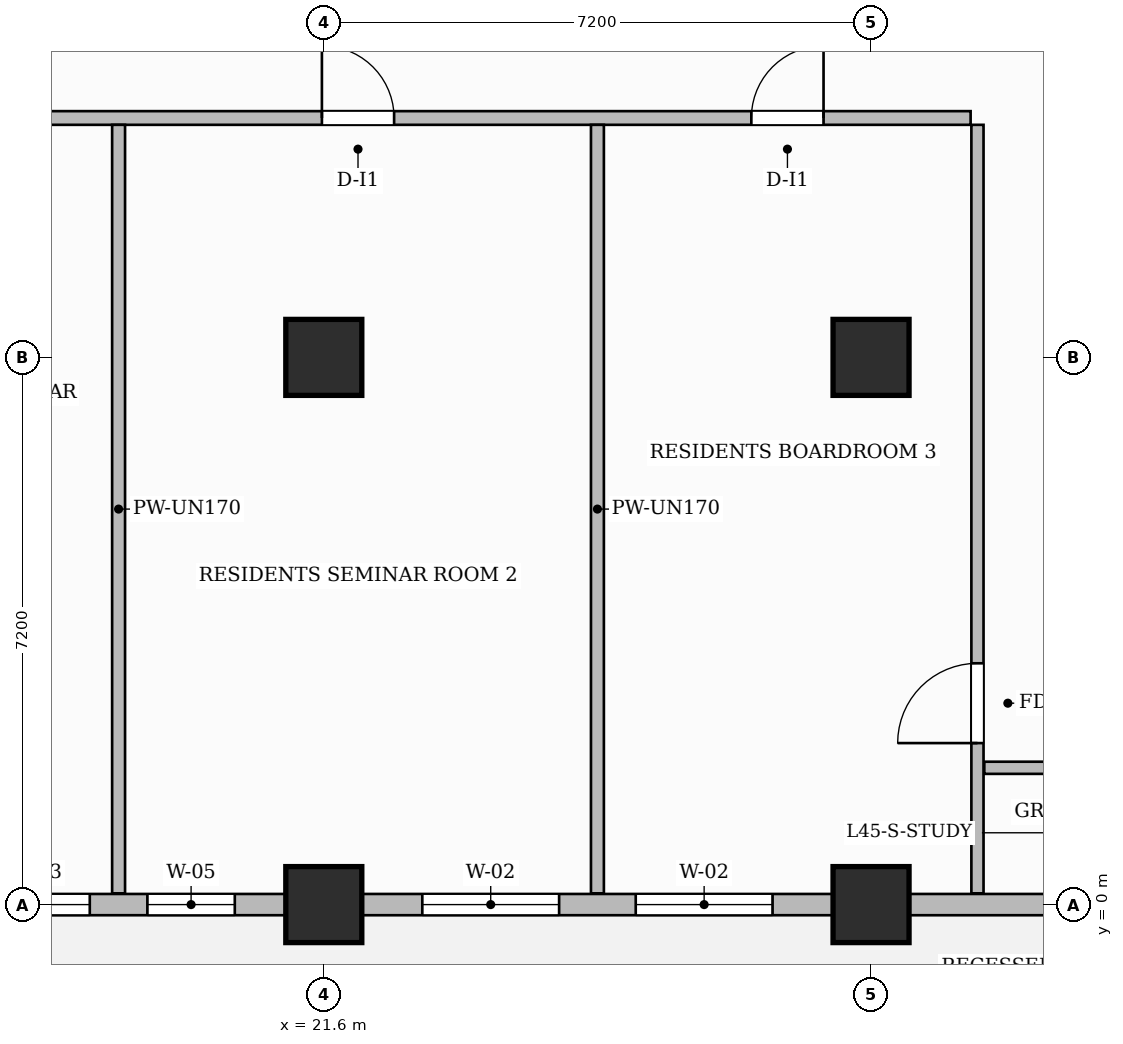
"""IFC4 building model, lengths in metres.
Left out: names, types, materials, properties, quantities, classifications, styles, units other than length and angle.
Written with IfcOpenShell. Run it as: python <this file> out.ifc"""

import sys

from ifc_helpers import new_model, si_unit, direction, frame, frame_2d, origin, origin_2d, place, context, subcontext, project, spatial, rectangle, extrude, source, transform, mapped, element, fill, save


model = new_model("IFC4")
c1 = context("Model", 3, precision=1e-05, world=origin(), true_north=direction((0.0, 1.0)))
c2 = subcontext(c1, "Body", "Model", "MODEL_VIEW")
j1 = project(units=[si_unit("LENGTHUNIT", "METRE"), si_unit("PLANEANGLEUNIT", "RADIAN")], contexts=[c1])
p1 = place(None, origin())
s1 = spatial("IfcSite", under=j1, at=p1, CompositionType="ELEMENT")
p2 = place(p1, origin())
s2 = spatial("IfcBuilding", under=s1, at=p2, CompositionType="ELEMENT")
p3 = place(p2, frame((0.0, 0.0, 181.1)))
s3 = spatial("IfcBuildingStorey", under=s2, at=p3, CompositionType="ELEMENT", Elevation=181.1)
m1 = source(origin(), c2, "Body", "SweptSolid", [
    extrude(rectangle(XDim=1.0, YDim=1.0, at=origin_2d()), origin(), (0.0, 0.0, 1.0), 3.85),
])
for number, where, z_axis, x_axis in (
    (1, (21.6, 0.0, 0.0), (0.0, 0.0, 1.0), (1.0, 0.0, 0.0)),
    (2, (21.6, 7.2, 0.0), (0.0, 0.0, 1.0), (1.0, 0.0, 0.0)),
    (3, (28.8, 0.0, 0.0), (0.0, 0.0, 1.0), (1.0, 0.0, 0.0)),
    (4, (28.8, 7.2, 0.0), (0.0, 0.0, 1.0), (1.0, 0.0, 0.0)),
):
    element("IfcColumn", number, at=place(p3, frame(where, z_axis=z_axis, x_axis=x_axis)), inside=s3, PredefinedType="COLUMN", context=c2, shape_type="MappedRepresentation", body=[
        mapped(m1, transform((0.0, 0.0, 0.0), scale=1.0)),
    ])
p4 = place(p3, frame((14.548, 10.35, 0.0), z_axis=(0.0, 0.0, 1.0), x_axis=(1.0, 0.0, 0.0)))
e5 = element("IfcWall", 5, at=p4, inside=s3, PredefinedType="PARTITIONING", context=c2, shape_type="SweptSolid", body=[
    extrude(rectangle(XDim=15.562, YDim=0.18, at=frame_2d((7.781, 0.0))), origin(), (0.0, 0.0, 1.0), 3.6),
])
p5 = place(p4, frame((1.627, 0.0, 0.0)))
e6 = element("IfcOpeningElement", 6, at=p5, cuts=e5, PredefinedType="OPENING", context=c2, shape_type="SweptSolid", body=[
    extrude(rectangle(XDim=0.95, YDim=2.15, at=frame_2d((0.475, 1.075))), frame((0.0, 0.1, 0.0), z_axis=(0.0, -1.0, 0.0), x_axis=(1.0, 0.0, 0.0)), (0.0, 0.0, 1.0), 0.2),
])
p6 = place(p4, frame((7.027, 0.0, 0.0)))
e7 = element("IfcOpeningElement", 7, at=p6, cuts=e5, PredefinedType="OPENING", context=c2, shape_type="SweptSolid", body=[
    extrude(rectangle(XDim=0.95, YDim=2.15, at=frame_2d((0.475, 1.075))), frame((0.0, 0.1, 0.0), z_axis=(0.0, -1.0, 0.0), x_axis=(1.0, 0.0, 0.0)), (0.0, 0.0, 1.0), 0.2),
])
p7 = place(p4, frame((12.677, 0.0, 0.0)))
e8 = element("IfcOpeningElement", 8, at=p7, cuts=e5, PredefinedType="OPENING", context=c2, shape_type="SweptSolid", body=[
    extrude(rectangle(XDim=0.95, YDim=2.15, at=frame_2d((0.475, 1.075))), frame((0.0, 0.1, 0.0), z_axis=(0.0, -1.0, 0.0), x_axis=(1.0, 0.0, 0.0)), (0.0, 0.0, 1.0), 0.2),
])
p8 = place(p3, frame((30.2, 0.148, 0.0), z_axis=(0.0, 0.0, 1.0), x_axis=(0.0, 1.0, 0.0)))
e9 = element("IfcWall", 9, at=p8, inside=s3, PredefinedType="PARTITIONING", context=c2, shape_type="SweptSolid", body=[
    extrude(rectangle(XDim=10.112, YDim=0.16, at=frame_2d((5.056, 0.0))), origin(), (0.0, 0.0, 1.0), 3.6),
])
p9 = place(p8, frame((1.977, 0.0, 0.0)))
e10 = element("IfcOpeningElement", 10, at=p9, cuts=e9, PredefinedType="OPENING", context=c2, shape_type="SweptSolid", body=[
    extrude(rectangle(XDim=1.05, YDim=2.15, at=frame_2d((0.525, 1.075))), frame((0.0, 0.09, 0.0), z_axis=(0.0, -1.0, 0.0), x_axis=(1.0, 0.0, 0.0)), (0.0, 0.0, 1.0), 0.18),
])
p10 = place(p3, frame((30.29, 1.8, 0.0), z_axis=(0.0, 0.0, 1.0), x_axis=(1.0, 0.0, 0.0)))
e11 = element("IfcWall", 11, at=p10, inside=s3, PredefinedType="PARTITIONING", context=c2, shape_type="SweptSolid", body=[
    extrude(rectangle(XDim=19.37, YDim=0.16, at=frame_2d((9.685, 0.0))), origin(), (0.0, 0.0, 1.0), 3.6),
])
p11 = place(p10, frame((5.074, 0.0, 0.0)))
e12 = element("IfcOpeningElement", 12, at=p11, cuts=e11, PredefinedType="OPENING", context=c2, shape_type="SweptSolid", body=[
    extrude(rectangle(XDim=0.9, YDim=2.15, at=frame_2d((0.45, 1.075))), frame((0.0, 0.09, 0.0), z_axis=(0.0, -1.0, 0.0), x_axis=(1.0, 0.0, 0.0)), (0.0, 0.0, 1.0), 0.18),
])
p12 = place(p10, frame((14.06, 0.0, 0.0)))
e13 = element("IfcOpeningElement", 13, at=p12, cuts=e11, PredefinedType="OPENING", context=c2, shape_type="SweptSolid", body=[
    extrude(rectangle(XDim=0.9, YDim=2.15, at=frame_2d((0.45, 1.075))), frame((0.0, 0.09, 0.0), z_axis=(0.0, -1.0, 0.0), x_axis=(1.0, 0.0, 0.0)), (0.0, 0.0, 1.0), 0.18),
])
p13 = place(p3, frame((18.9, 0.148, 0.0), z_axis=(0.0, 0.0, 1.0), x_axis=(0.0, 1.0, 0.0)))
e14 = element("IfcWall", 14, at=p13, inside=s3, PredefinedType="PARTITIONING", context=c2, shape_type="SweptSolid", body=[
    extrude(rectangle(XDim=10.112, YDim=0.17, at=frame_2d((5.056, 0.0))), origin(), (0.0, 0.0, 1.0), 3.6),
])
p14 = place(p3, frame((25.2, 0.148, 0.0), z_axis=(0.0, 0.0, 1.0), x_axis=(0.0, 1.0, 0.0)))
e15 = element("IfcWall", 15, at=p14, inside=s3, PredefinedType="PARTITIONING", context=c2, shape_type="SweptSolid", body=[
    extrude(rectangle(XDim=10.112, YDim=0.17, at=frame_2d((5.056, 0.0))), origin(), (0.0, 0.0, 1.0), 3.285),
])
p15 = place(p3, frame((14.4, 0.0, 0.0), z_axis=(0.0, 0.0, 1.0), x_axis=(1.0, 0.0, 0.0)))
e16 = element("IfcWall", 16, at=p15, inside=s3, PredefinedType="SOLIDWALL", context=c2, shape_type="SweptSolid", body=[
    extrude(rectangle(XDim=35.4, YDim=0.28, at=frame_2d((17.7, 0.0))), origin(), (0.0, 0.0, 1.0), 3.085),
])
p16 = place(p15, frame((0.85, 0.0, 0.0)))
e17 = element("IfcOpeningElement", 17, at=p16, cuts=e16, PredefinedType="OPENING", context=c2, shape_type="SweptSolid", body=[
    extrude(rectangle(XDim=1.2, YDim=2.2, at=frame_2d((0.6, 1.1))), frame((0.0, 0.15, 0.0), z_axis=(0.0, -1.0, 0.0), x_axis=(1.0, 0.0, 0.0)), (0.0, 0.0, 1.0), 0.3),
])
p17 = place(p15, frame((2.721, 0.0, 0.8)))
e18 = element("IfcOpeningElement", 18, at=p17, cuts=e16, PredefinedType="OPENING", context=c2, shape_type="SweptSolid", body=[
    extrude(rectangle(XDim=1.4, YDim=1.85, at=frame_2d((0.7, 0.925))), frame((0.0, 0.15, 0.0), z_axis=(0.0, -1.0, 0.0), x_axis=(1.0, 0.0, 0.0)), (0.0, 0.0, 1.0), 0.3),
])
p18 = place(p15, frame((4.879, 0.0, 0.8)))
e19 = element("IfcOpeningElement", 19, at=p18, cuts=e16, PredefinedType="OPENING", context=c2, shape_type="SweptSolid", body=[
    extrude(rectangle(XDim=1.15, YDim=1.8, at=frame_2d((0.575, 0.9))), frame((0.0, 0.15, 0.0), z_axis=(0.0, -1.0, 0.0), x_axis=(1.0, 0.0, 0.0)), (0.0, 0.0, 1.0), 0.3),
])
p19 = place(p15, frame((8.496, 0.0, 0.8)))
e20 = element("IfcOpeningElement", 20, at=p19, cuts=e16, PredefinedType="OPENING", context=c2, shape_type="SweptSolid", body=[
    extrude(rectangle(XDim=1.8, YDim=1.85, at=frame_2d((0.9, 0.925))), frame((0.0, 0.15, 0.0), z_axis=(0.0, -1.0, 0.0), x_axis=(1.0, 0.0, 0.0)), (0.0, 0.0, 1.0), 0.3),
])
p20 = place(p15, frame((11.304, 0.0, 0.8)))
e21 = element("IfcOpeningElement", 21, at=p20, cuts=e16, PredefinedType="OPENING", context=c2, shape_type="SweptSolid", body=[
    extrude(rectangle(XDim=1.8, YDim=1.85, at=frame_2d((0.9, 0.925))), frame((0.0, 0.15, 0.0), z_axis=(0.0, -1.0, 0.0), x_axis=(1.0, 0.0, 0.0)), (0.0, 0.0, 1.0), 0.3),
])
p21 = place(p15, frame((16.804, 0.0, 0.8)))
e22 = element("IfcOpeningElement", 22, at=p21, cuts=e16, PredefinedType="OPENING", context=c2, shape_type="SweptSolid", body=[
    extrude(rectangle(XDim=1.8, YDim=1.85, at=frame_2d((0.9, 0.925))), frame((0.0, 0.15, 0.0), z_axis=(0.0, -1.0, 0.0), x_axis=(1.0, 0.0, 0.0)), (0.0, 0.0, 1.0), 0.3),
])
p22 = place(p15, frame((22.396, 0.0, 0.8)))
e23 = element("IfcOpeningElement", 23, at=p22, cuts=e16, PredefinedType="OPENING", context=c2, shape_type="SweptSolid", body=[
    extrude(rectangle(XDim=1.8, YDim=1.85, at=frame_2d((0.9, 0.925))), frame((0.0, 0.15, 0.0), z_axis=(0.0, -1.0, 0.0), x_axis=(1.0, 0.0, 0.0)), (0.0, 0.0, 1.0), 0.3),
])
p23 = place(p15, frame((25.629, 0.0, 0.8)))
e24 = element("IfcOpeningElement", 24, at=p23, cuts=e16, PredefinedType="OPENING", context=c2, shape_type="SweptSolid", body=[
    extrude(rectangle(XDim=0.95, YDim=1.75, at=frame_2d((0.475, 0.875))), frame((0.0, 0.15, 0.0), z_axis=(0.0, -1.0, 0.0), x_axis=(1.0, 0.0, 0.0)), (0.0, 0.0, 1.0), 0.3),
])
p24 = place(p15, frame((29.075, 0.0, 0.8)))
e25 = element("IfcOpeningElement", 25, at=p24, cuts=e16, PredefinedType="OPENING", context=c2, shape_type="SweptSolid", body=[
    extrude(rectangle(XDim=1.8, YDim=1.85, at=frame_2d((0.9, 0.925))), frame((0.0, 0.15, 0.0), z_axis=(0.0, -1.0, 0.0), x_axis=(1.0, 0.0, 0.0)), (0.0, 0.0, 1.0), 0.3),
])
p25 = place(p15, frame((32.125, 0.0, 0.8)))
e26 = element("IfcOpeningElement", 26, at=p25, cuts=e16, PredefinedType="OPENING", context=c2, shape_type="SweptSolid", body=[
    extrude(rectangle(XDim=1.8, YDim=1.85, at=frame_2d((0.9, 0.925))), frame((0.0, 0.15, 0.0), z_axis=(0.0, -1.0, 0.0), x_axis=(1.0, 0.0, 0.0)), (0.0, 0.0, 1.0), 0.3),
])
m2 = source(origin(), c2, "Body", "SweptSolid", [
    extrude(rectangle(XDim=1.05, YDim=2.15, at=frame_2d((0.525, 1.075))), frame((0.0, 0.025, 0.0), z_axis=(0.0, -1.0, 0.0), x_axis=(1.0, 0.0, 0.0)), (0.0, 0.0, 1.0), 0.05),
])
p26 = place(p9, origin())
e27 = element("IfcDoor", 27, at=p26, inside=s3, OperationType="SINGLE_SWING_LEFT", PredefinedType="DOOR", context=c2, shape_type="MappedRepresentation", body=[
    mapped(m2, transform((0.0, 0.0, 0.0), scale=1.0)),
])
fill(e10, e27)
m3 = source(origin(), c2, "Body", "SweptSolid", [
    extrude(rectangle(XDim=0.95, YDim=2.15, at=frame_2d((0.475, 1.075))), frame((0.0, 0.025, 0.0), z_axis=(0.0, -1.0, 0.0), x_axis=(1.0, 0.0, 0.0)), (0.0, 0.0, 1.0), 0.05),
])
p27 = place(p6, origin())
e28 = element("IfcDoor", 28, at=p27, inside=s3, OperationType="SINGLE_SWING_LEFT", PredefinedType="DOOR", context=c2, shape_type="MappedRepresentation", body=[
    mapped(m3, transform((0.0, 0.0, 0.0), scale=1.0)),
])
fill(e7, e28)
p28 = place(p7, origin())
e29 = element("IfcDoor", 29, at=p28, inside=s3, OperationType="SINGLE_SWING_RIGHT", PredefinedType="DOOR", context=c2, shape_type="MappedRepresentation", body=[
    mapped(m3, transform((0.0, 0.0, 0.0), scale=1.0)),
])
fill(e8, e29)
m4 = source(origin(), c2, "Body", "SweptSolid", [
    extrude(rectangle(XDim=1.4, YDim=1.85, at=frame_2d((0.7, 0.925))), frame((0.0, 0.03, 0.0), z_axis=(0.0, -1.0, 0.0), x_axis=(1.0, 0.0, 0.0)), (0.0, 0.0, 1.0), 0.06),
])
p29 = place(p17, origin())
e30 = element("IfcWindow", 30, at=p29, inside=s3, PartitioningType="SINGLE_PANEL", PredefinedType="WINDOW", context=c2, shape_type="MappedRepresentation", body=[
    mapped(m4, transform((0.0, 0.0, 0.0), scale=1.0)),
])
fill(e18, e30)
m5 = source(origin(), c2, "Body", "SweptSolid", [
    extrude(rectangle(XDim=1.15, YDim=1.8, at=frame_2d((0.575, 0.9))), frame((0.0, 0.03, 0.0), z_axis=(0.0, -1.0, 0.0), x_axis=(1.0, 0.0, 0.0)), (0.0, 0.0, 1.0), 0.06),
])
p30 = place(p18, origin())
e31 = element("IfcWindow", 31, at=p30, inside=s3, PartitioningType="SINGLE_PANEL", PredefinedType="WINDOW", context=c2, shape_type="MappedRepresentation", body=[
    mapped(m5, transform((0.0, 0.0, 0.0), scale=1.0)),
])
fill(e19, e31)
m6 = source(origin(), c2, "Body", "SweptSolid", [
    extrude(rectangle(XDim=1.8, YDim=1.85, at=frame_2d((0.9, 0.925))), frame((0.0, 0.03, 0.0), z_axis=(0.0, -1.0, 0.0), x_axis=(1.0, 0.0, 0.0)), (0.0, 0.0, 1.0), 0.06),
])
p31 = place(p19, origin())
e32 = element("IfcWindow", 32, at=p31, inside=s3, PartitioningType="DOUBLE_PANEL_VERTICAL", PredefinedType="WINDOW", context=c2, shape_type="MappedRepresentation", body=[
    mapped(m6, transform((0.0, 0.0, 0.0), scale=1.0)),
])
fill(e20, e32)
p32 = place(p20, origin())
e33 = element("IfcWindow", 33, at=p32, inside=s3, PartitioningType="DOUBLE_PANEL_VERTICAL", PredefinedType="WINDOW", context=c2, shape_type="MappedRepresentation", body=[
    mapped(m6, transform((0.0, 0.0, 0.0), scale=1.0)),
])
fill(e21, e33)
save(model, sys.argv[1])
